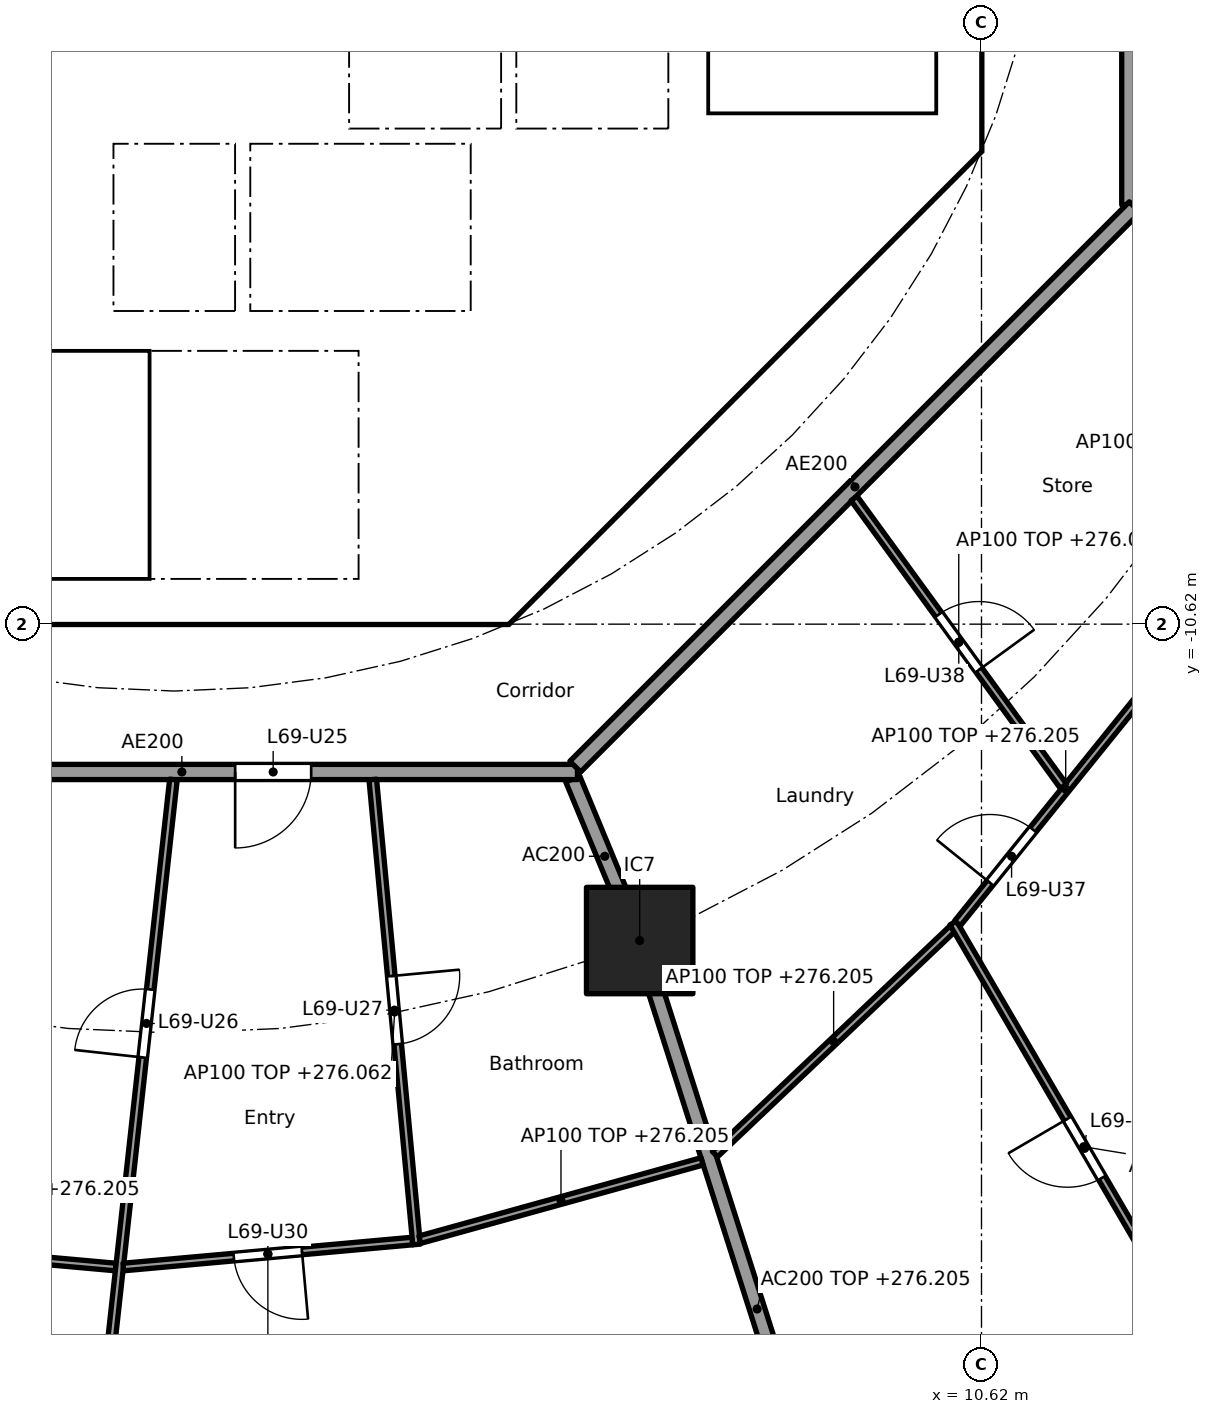
"""IFC4 building model, lengths in metres.
Left out: names, types, materials, properties, quantities, classifications, styles, units other than length and angle.
Written with IfcOpenShell. Run it as: python <this file> out.ifc"""

import sys

from ifc_helpers import new_model, si_unit, direction, frame, frame_2d, origin, origin_2d, place, context, subcontext, project, spatial, polyline, rectangle, outline, extrude, element, fill, save


model = new_model("IFC4")
c1 = context("Model", 3, precision=1e-05, world=origin(), true_north=direction((0.0, 1.0)))
c2 = subcontext(c1, "Body", "Model", "MODEL_VIEW")
j1 = project(units=[si_unit("LENGTHUNIT", "METRE"), si_unit("PLANEANGLEUNIT", "RADIAN")], contexts=[c1])
p1 = place(None, origin())
s1 = spatial("IfcSite", under=j1, at=p1, CompositionType="ELEMENT")
p2 = place(p1, origin())
s2 = spatial("IfcBuilding", under=s1, at=p2, CompositionType="ELEMENT")
p3 = place(p2, frame((0.0, 0.0, 273.3)))
s3 = spatial("IfcBuildingStorey", under=s2, at=p3, CompositionType="ELEMENT", Elevation=273.3)
p4 = place(p3, frame((6.123, -14.782, 0.0), z_axis=(0.0, 0.0, 1.0), x_axis=(1.0, 0.0, 0.0)))
e1 = element("IfcColumn", 1, at=p4, inside=s3, PredefinedType="COLUMN", context=c2, shape_type="SweptSolid", body=[
    extrude(rectangle(XDim=1.4, YDim=1.4, at=origin_2d()), origin(), (0.0, 0.0, 1.0), 3.7),
])
p5 = place(p3, frame((4.613, -9.988, 0.0), z_axis=(0.0, 0.0, 1.0), x_axis=(0.707106781187, 0.707106781187, 0.0)))
e2 = element("IfcWall", 2, at=p5, inside=s3, PredefinedType="SHEAR", context=c2, shape_type="SweptSolid", body=[
    extrude(rectangle(XDim=7.602, YDim=0.6, at=frame_2d((3.801, 0.0))), origin(), (0.0, 0.0, 1.0), 3.44),
])
p6 = place(p5, frame((3.201, 0.0, 0.0)))
e3 = element("IfcOpeningElement", 3, at=p6, cuts=e2, PredefinedType="OPENING", context=c2, shape_type="SweptSolid", body=[
    extrude(rectangle(XDim=1.2, YDim=2.1, at=frame_2d((0.6, 1.05))), frame((0.0, 0.31, 0.0), z_axis=(0.0, -1.0, 0.0), x_axis=(1.0, 0.0, 0.0)), (0.0, 0.0, 1.0), 0.62),
])
p7 = place(p3, frame((4.0, -10.025, 0.0), z_axis=(0.0, 0.0, 1.0), x_axis=(0.0, 1.0, 0.0)))
e4 = element("IfcWall", 4, at=p7, inside=s3, PredefinedType="SOLIDWALL", context=c2, shape_type="SweptSolid", body=[
    extrude(rectangle(XDim=3.0, YDim=0.2, at=frame_2d((1.5, 0.0))), origin(), (0.0, 0.0, 1.0), 3.44),
])
p8 = place(p7, frame((0.975, 0.0, 0.0)))
e5 = element("IfcOpeningElement", 5, at=p8, cuts=e4, PredefinedType="OPENING", context=c2, shape_type="SweptSolid", body=[
    extrude(rectangle(XDim=1.1, YDim=2.1, at=frame_2d((0.55, 1.05))), frame((0.0, 0.11, 0.0), z_axis=(0.0, -1.0, 0.0), x_axis=(1.0, 0.0, 0.0)), (0.0, 0.0, 1.0), 0.22),
])
p9 = place(p3, frame((4.0, -6.5, 0.0), z_axis=(0.0, 0.0, 1.0), x_axis=(0.0, 1.0, 0.0)))
e6 = element("IfcWall", 6, at=p9, inside=s3, PredefinedType="SOLIDWALL", context=c2, shape_type="SweptSolid", body=[
    extrude(rectangle(XDim=2.2, YDim=0.2, at=frame_2d((1.1, 0.0))), origin(), (0.0, 0.0, 1.0), 3.44),
])
p10 = place(p9, frame((0.55, 0.0, 0.0)))
e7 = element("IfcOpeningElement", 7, at=p10, cuts=e6, PredefinedType="OPENING", context=c2, shape_type="SweptSolid", body=[
    extrude(rectangle(XDim=1.1, YDim=2.1, at=frame_2d((0.55, 1.05))), frame((0.0, 0.11, 0.0), z_axis=(0.0, -1.0, 0.0), x_axis=(1.0, 0.0, 0.0)), (0.0, 0.0, 1.0), 0.22),
])
p11 = place(p3, origin())
e8 = element("IfcWall", 8, at=p11, inside=s3, PredefinedType="SHEAR", context=c2, shape_type="SweptSolid", body=[
    extrude(outline(polyline([(-4.152, -10.025), (4.152, -10.025), (4.401, -9.776), (4.825, -10.2), (4.401, -10.625), (-4.401, -10.625), (-4.825, -10.2), (-4.401, -9.776), (-4.152, -10.025)])), origin(), (0.0, 0.0, 1.0), 3.44),
])
p12 = place(p3, origin())
e9 = element("IfcWall", 9, at=p12, inside=s3, PredefinedType="SHEAR", context=c2, shape_type="SweptSolid", body=[
    extrude(outline(polyline([(9.776, -4.401), (10.025, -4.152), (10.025, -3.801), (10.025, 4.152), (9.776, 4.401), (10.2, 4.825), (10.625, 4.401), (10.625, -4.401), (10.2, -4.825), (9.776, -4.401)])), origin(), (0.0, 0.0, 1.0), 3.44),
])
for number, where, z_axis, x_axis in (
    (10, (-0.9, -6.5, 0.0), (0.0, 0.0, 1.0), (0.0, 1.0, 0.0)),
    (11, (0.9, -6.5, 0.0), (0.0, 0.0, 1.0), (0.0, 1.0, 0.0)),
):
    element("IfcWall", number, at=place(p3, frame(where, z_axis=z_axis, x_axis=x_axis)), inside=s3, PredefinedType="SOLIDWALL", context=c2, shape_type="SweptSolid", body=[
        extrude(rectangle(XDim=2.2, YDim=0.2, at=frame_2d((1.1, 0.0))), origin(), (0.0, 0.0, 1.0), 3.44),
    ])
p13 = place(p3, origin())
e12 = element("IfcWall", 12, at=p13, inside=s3, PredefinedType="SOLIDWALL", context=c2, shape_type="SweptSolid", body=[
    extrude(outline(polyline([(-6.7, -2.1), (-6.5, -2.1), (-6.5, -4.1), (-2.3, -4.1), (-2.3, -2.1), (-2.1, -2.1), (-2.1, -4.1), (2.1, -4.1), (2.1, -2.1), (2.3, -2.1), (2.3, -4.1), (4.3, -4.1), (4.3, -2.1), (4.5, -2.1), (4.5, -4.1), (6.5, -4.1), (6.5, -2.1), (6.7, -2.1), (6.7, -4.3), (-6.7, -4.3), (-6.7, -2.1)])), origin(), (0.0, 0.0, 1.0), 3.44),
])
p14 = place(p3, origin())
e13 = element("IfcWall", 13, at=p14, inside=s3, PredefinedType="SOLIDWALL", context=c2, shape_type="SweptSolid", body=[
    extrude(outline(polyline([(4.1, -7.025), (-4.1, -7.025), (-4.1, -6.5), (4.1, -6.5), (4.1, -7.025)])), origin(), (0.0, 0.0, 1.0), 3.44),
])
p15 = place(p3, origin())
e14 = element("IfcWall", 14, at=p15, inside=s3, PredefinedType="SOLIDWALL", context=c2, shape_type="SweptSolid", body=[
    extrude(outline(polyline([(7.025, -3.9), (6.7, -3.9), (6.7, 3.9), (7.025, 3.9), (7.025, -3.9)])), origin(), (0.0, 0.0, 1.0), 3.44),
])
p16 = place(p3, origin())
e15 = element("IfcWall", 15, at=p16, inside=s3, PredefinedType="SOLIDWALL", context=c2, shape_type="SweptSolid", body=[
    extrude(outline(polyline([(10.025, -4.1), (6.7, -4.1), (6.7, -3.9), (10.025, -3.9), (10.025, -4.1)])), origin(), (0.0, 0.0, 1.0), 3.44),
])
p17 = place(p3, frame((5.243, -12.657, 0.0), z_axis=(0.0, 0.0, 1.0), x_axis=(0.382707856524, -0.923869415315, 0.0)))
e16 = element("IfcWall", 16, at=p17, inside=s3, PredefinedType="PARTITIONING", context=c2, shape_type="SweptSolid", body=[
    extrude(rectangle(XDim=2.2, YDim=0.2, at=frame_2d((1.1, 0.0))), origin(), (0.0, 0.0, 1.0), 3.44),
])
p18 = place(p3, frame((6.138, -14.83, 0.0), z_axis=(0.0, 0.0, 1.0), x_axis=(0.303653679037, -0.952782474234, 0.0)))
e17 = element("IfcWall", 17, at=p18, inside=s3, PredefinedType="PARTITIONING", context=c2, shape_type="SweptSolid", body=[
    extrude(rectangle(XDim=10.076, YDim=0.2, at=frame_2d((5.038, 0.0))), origin(), (0.0, 0.0, 1.0), 2.905),
])
p19 = place(p3, frame((12.565, -5.104, 0.0), z_axis=(0.0, 0.0, 1.0), x_axis=(0.0, 1.0, 0.0)))
e18 = element("IfcWall", 18, at=p19, inside=s3, PredefinedType="PARTITIONING", context=c2, shape_type="SweptSolid", body=[
    extrude(rectangle(XDim=10.209, YDim=0.2, at=frame_2d((5.104, 0.0))), origin(), (0.0, 0.0, 1.0), 3.44),
])
p20 = place(p19, frame((4.604, 0.0, 0.0)))
e19 = element("IfcOpeningElement", 19, at=p20, cuts=e18, PredefinedType="OPENING", context=c2, shape_type="SweptSolid", body=[
    extrude(rectangle(XDim=1.0, YDim=2.1, at=frame_2d((0.5, 1.05))), frame((0.0, 0.11, 0.0), z_axis=(0.0, -1.0, 0.0), x_axis=(1.0, 0.0, 0.0)), (0.0, 0.0, 1.0), 0.22),
])
p21 = place(p3, frame((-5.104, -12.565, 0.0), z_axis=(0.0, 0.0, 1.0), x_axis=(1.0, 0.0, 0.0)))
e20 = element("IfcWall", 20, at=p21, inside=s3, PredefinedType="PARTITIONING", context=c2, shape_type="SweptSolid", body=[
    extrude(rectangle(XDim=10.409, YDim=0.2, at=frame_2d((5.205, 0.0))), origin(), (0.0, 0.0, 1.0), 3.44),
])
p22 = place(p21, frame((5.906, 0.0, 0.0)))
e21 = element("IfcOpeningElement", 21, at=p22, cuts=e20, PredefinedType="OPENING", context=c2, shape_type="SweptSolid", body=[
    extrude(rectangle(XDim=1.0, YDim=2.1, at=frame_2d((0.5, 1.05))), frame((0.0, 0.11, 0.0), z_axis=(0.0, -1.0, 0.0), x_axis=(1.0, 0.0, 0.0)), (0.0, 0.0, 1.0), 0.22),
])
p23 = place(p3, frame((5.275, -12.494, 0.0), z_axis=(0.0, 0.0, 1.0), x_axis=(0.707106781187, 0.707106781187, 0.0)))
e22 = element("IfcWall", 22, at=p23, inside=s3, PredefinedType="PARTITIONING", context=c2, shape_type="SweptSolid", body=[
    extrude(rectangle(XDim=10.409, YDim=0.2, at=frame_2d((5.205, 0.0))), origin(), (0.0, 0.0, 1.0), 3.44),
])
p24 = place(p3, frame((-4.573, -18.736, 0.0), z_axis=(0.0, 0.0, 1.0), x_axis=(0.995986472869, -0.089503887414, 0.0)))
e23 = element("IfcWall", 23, at=p24, inside=s3, PredefinedType="PARTITIONING", context=c2, shape_type="SweptSolid", body=[
    extrude(rectangle(XDim=3.819, YDim=0.1, at=frame_2d((1.909, 0.0))), origin(), (0.0, 0.0, 1.0), 2.905),
])
p25 = place(p3, frame((-0.011, -12.664, 0.0), z_axis=(0.0, 0.0, 1.0), x_axis=(-0.109805889692, -0.993953050495, 0.0)))
e24 = element("IfcWall", 24, at=p25, inside=s3, PredefinedType="PARTITIONING", context=c2, shape_type="SweptSolid", body=[
    extrude(rectangle(XDim=15.248, YDim=0.1, at=frame_2d((7.624, 0.0))), origin(), (0.0, 0.0, 1.0), 2.762),
])
p26 = place(p25, frame((2.778, 0.0, 0.0)))
e25 = element("IfcOpeningElement", 25, at=p26, cuts=e24, PredefinedType="OPENING", context=c2, shape_type="SweptSolid", body=[
    extrude(rectangle(XDim=0.9, YDim=2.1, at=frame_2d((0.45, 1.05))), frame((0.0, 0.06, 0.0), z_axis=(0.0, -1.0, 0.0), x_axis=(1.0, 0.0, 0.0)), (0.0, 0.0, 1.0), 0.12),
])
p27 = place(p3, frame((-0.67, -19.077, 0.0), z_axis=(0.0, 0.0, 1.0), x_axis=(0.995986472869, 0.089503887414, 0.0)))
e26 = element("IfcWall", 26, at=p27, inside=s3, PredefinedType="PARTITIONING", context=c2, shape_type="SweptSolid", body=[
    extrude(rectangle(XDim=3.819, YDim=0.1, at=frame_2d((1.909, 0.0))), origin(), (0.0, 0.0, 1.0), 2.905),
])
p28 = place(p27, frame((1.459, 0.0, 0.0)))
e27 = element("IfcOpeningElement", 27, at=p28, cuts=e26, PredefinedType="OPENING", context=c2, shape_type="SweptSolid", body=[
    extrude(rectangle(XDim=0.9, YDim=2.1, at=frame_2d((0.45, 1.05))), frame((0.0, 0.06, 0.0), z_axis=(0.0, -1.0, 0.0), x_axis=(1.0, 0.0, 0.0)), (0.0, 0.0, 1.0), 0.12),
])
p29 = place(p3, frame((2.612, -12.664, 0.0), z_axis=(0.0, 0.0, 1.0), x_axis=(0.093781393779, -0.995592813444, 0.0)))
e28 = element("IfcWall", 28, at=p29, inside=s3, PredefinedType="PARTITIONING", context=c2, shape_type="SweptSolid", body=[
    extrude(rectangle(XDim=6.144, YDim=0.1, at=frame_2d((3.072, 0.0))), origin(), (0.0, 0.0, 1.0), 2.762),
])
p30 = place(p29, frame((2.597, 0.0, 0.0)))
e29 = element("IfcOpeningElement", 29, at=p30, cuts=e28, PredefinedType="OPENING", context=c2, shape_type="SweptSolid", body=[
    extrude(rectangle(XDim=0.9, YDim=2.1, at=frame_2d((0.45, 1.05))), frame((0.0, 0.06, 0.0), z_axis=(0.0, -1.0, 0.0), x_axis=(1.0, 0.0, 0.0)), (0.0, 0.0, 1.0), 0.12),
])
p31 = place(p3, frame((3.231, -18.718, 0.0), z_axis=(0.0, 0.0, 1.0), x_axis=(0.963606817151, 0.267323590318, 0.0)))
e30 = element("IfcWall", 30, at=p31, inside=s3, PredefinedType="PARTITIONING", context=c2, shape_type="SweptSolid", body=[
    extrude(rectangle(XDim=3.853, YDim=0.1, at=frame_2d((1.927, 0.0))), origin(), (0.0, 0.0, 1.0), 2.905),
])
p32 = place(p3, frame((7.113, -17.592, 0.0), z_axis=(0.0, 0.0, 1.0), x_axis=(0.725433932329, 0.688291805723, 0.0)))
e31 = element("IfcWall", 31, at=p32, inside=s3, PredefinedType="PARTITIONING", context=c2, shape_type="SweptSolid", body=[
    extrude(rectangle(XDim=4.305, YDim=0.1, at=frame_2d((2.153, 0.0))), origin(), (0.0, 0.0, 1.0), 2.905),
])
p33 = place(p3, frame((10.248, -14.551, 0.0), z_axis=(0.0, 0.0, 1.0), x_axis=(0.503826483408, -0.86380488226, 0.0)))
e32 = element("IfcWall", 32, at=p33, inside=s3, PredefinedType="PARTITIONING", context=c2, shape_type="SweptSolid", body=[
    extrude(rectangle(XDim=6.816, YDim=0.1, at=frame_2d((3.408, 0.0))), origin(), (0.0, 0.0, 1.0), 3.44),
])
p34 = place(p33, frame((2.983, 0.0, 0.0)))
e33 = element("IfcOpeningElement", 33, at=p34, cuts=e32, PredefinedType="OPENING", context=c2, shape_type="SweptSolid", body=[
    extrude(rectangle(XDim=0.9, YDim=2.1, at=frame_2d((0.45, 1.05))), frame((0.0, 0.06, 0.0), z_axis=(0.0, -1.0, 0.0), x_axis=(1.0, 0.0, 0.0)), (0.0, 0.0, 1.0), 0.12),
])
p35 = place(p3, frame((10.304, -14.555, 0.0), z_axis=(0.0, 0.0, 1.0), x_axis=(0.628170338674, 0.778075848237, 0.0)))
e34 = element("IfcWall", 34, at=p35, inside=s3, PredefinedType="PARTITIONING", context=c2, shape_type="SweptSolid", body=[
    extrude(rectangle(XDim=4.532, YDim=0.1, at=frame_2d((2.266, 0.0))), origin(), (0.0, 0.0, 1.0), 2.905),
])
p36 = place(p35, frame((0.683, 0.0, 0.0)))
e35 = element("IfcOpeningElement", 35, at=p36, cuts=e34, PredefinedType="OPENING", context=c2, shape_type="SweptSolid", body=[
    extrude(rectangle(XDim=0.9, YDim=2.1, at=frame_2d((0.45, 1.05))), frame((0.0, 0.06, 0.0), z_axis=(0.0, -1.0, 0.0), x_axis=(1.0, 0.0, 0.0)), (0.0, 0.0, 1.0), 0.12),
])
p37 = place(p3, frame((8.943, -8.966, 0.0), z_axis=(0.0, 0.0, 1.0), x_axis=(0.588357698232, -0.808600778463, 0.0)))
e36 = element("IfcWall", 36, at=p37, inside=s3, PredefinedType="PARTITIONING", context=c2, shape_type="SweptSolid", body=[
    extrude(rectangle(XDim=4.682, YDim=0.1, at=frame_2d((2.341, 0.0))), origin(), (0.0, 0.0, 1.0), 2.762),
])
p38 = place(p37, frame((1.891, 0.0, 0.0)))
e37 = element("IfcOpeningElement", 37, at=p38, cuts=e36, PredefinedType="OPENING", context=c2, shape_type="SweptSolid", body=[
    extrude(rectangle(XDim=0.9, YDim=2.1, at=frame_2d((0.45, 1.05))), frame((0.0, 0.06, 0.0), z_axis=(0.0, -1.0, 0.0), x_axis=(1.0, 0.0, 0.0)), (0.0, 0.0, 1.0), 0.12),
])
p39 = place(p10, origin())
e38 = element("IfcDoor", 38, at=p39, inside=s3, OperationType="DOUBLE_DOOR_SLIDING", PredefinedType="DOOR", context=c2, shape_type="SweptSolid", body=[
    extrude(rectangle(XDim=1.1, YDim=2.1, at=frame_2d((0.55, 1.05))), frame((0.0, 0.025, 0.0), z_axis=(0.0, -1.0, 0.0), x_axis=(1.0, 0.0, 0.0)), (0.0, 0.0, 1.0), 0.05),
])
fill(e7, e38)
p40 = place(p8, origin())
e39 = element("IfcDoor", 39, at=p40, inside=s3, OperationType="SINGLE_SWING_RIGHT", PredefinedType="DOOR", context=c2, shape_type="SweptSolid", body=[
    extrude(rectangle(XDim=1.1, YDim=2.1, at=frame_2d((0.55, 1.05))), frame((0.0, 0.025, 0.0), z_axis=(0.0, -1.0, 0.0), x_axis=(1.0, 0.0, 0.0)), (0.0, 0.0, 1.0), 0.05),
])
fill(e5, e39)
p41 = place(p6, origin())
e40 = element("IfcDoor", 40, at=p41, inside=s3, OperationType="SINGLE_SWING_RIGHT", PredefinedType="DOOR", context=c2, shape_type="SweptSolid", body=[
    extrude(rectangle(XDim=1.2, YDim=2.1, at=frame_2d((0.6, 1.05))), frame((0.0, 0.025, 0.0), z_axis=(0.0, -1.0, 0.0), x_axis=(1.0, 0.0, 0.0)), (0.0, 0.0, 1.0), 0.05),
])
fill(e3, e40)
p42 = place(p22, frame((1.0, 0.0, 0.0), x_axis=(-1.0, 0.0, 0.0)))
e41 = element("IfcDoor", 41, at=p42, inside=s3, OperationType="SINGLE_SWING_RIGHT", PredefinedType="DOOR", context=c2, shape_type="SweptSolid", body=[
    extrude(rectangle(XDim=1.0, YDim=2.1, at=frame_2d((0.5, 1.05))), frame((0.0, 0.025, 0.0), z_axis=(0.0, -1.0, 0.0), x_axis=(1.0, 0.0, 0.0)), (0.0, 0.0, 1.0), 0.05),
])
fill(e21, e41)
p43 = place(p26, frame((0.9, 0.0, 0.0), x_axis=(-1.0, 0.0, 0.0)))
e42 = element("IfcDoor", 42, at=p43, inside=s3, OperationType="SINGLE_SWING_LEFT", PredefinedType="DOOR", context=c2, shape_type="SweptSolid", body=[
    extrude(rectangle(XDim=0.9, YDim=2.1, at=frame_2d((0.45, 1.05))), frame((0.0, 0.025, 0.0), z_axis=(0.0, -1.0, 0.0), x_axis=(1.0, 0.0, 0.0)), (0.0, 0.0, 1.0), 0.05),
])
fill(e25, e42)
p44 = place(p30, origin())
e43 = element("IfcDoor", 43, at=p44, inside=s3, OperationType="SINGLE_SWING_LEFT", PredefinedType="DOOR", context=c2, shape_type="SweptSolid", body=[
    extrude(rectangle(XDim=0.9, YDim=2.1, at=frame_2d((0.45, 1.05))), frame((0.0, 0.025, 0.0), z_axis=(0.0, -1.0, 0.0), x_axis=(1.0, 0.0, 0.0)), (0.0, 0.0, 1.0), 0.05),
])
fill(e29, e43)
p45 = place(p28, frame((0.9, 0.0, 0.0), x_axis=(-1.0, 0.0, 0.0)))
e44 = element("IfcDoor", 44, at=p45, inside=s3, OperationType="SINGLE_SWING_LEFT", PredefinedType="DOOR", context=c2, shape_type="SweptSolid", body=[
    extrude(rectangle(XDim=0.9, YDim=2.1, at=frame_2d((0.45, 1.05))), frame((0.0, 0.025, 0.0), z_axis=(0.0, -1.0, 0.0), x_axis=(1.0, 0.0, 0.0)), (0.0, 0.0, 1.0), 0.05),
])
fill(e27, e44)
p46 = place(p36, origin())
e45 = element("IfcDoor", 45, at=p46, inside=s3, OperationType="SINGLE_SWING_LEFT", PredefinedType="DOOR", context=c2, shape_type="SweptSolid", body=[
    extrude(rectangle(XDim=0.9, YDim=2.1, at=frame_2d((0.45, 1.05))), frame((0.0, 0.025, 0.0), z_axis=(0.0, -1.0, 0.0), x_axis=(1.0, 0.0, 0.0)), (0.0, 0.0, 1.0), 0.05),
])
fill(e35, e45)
p47 = place(p38, origin())
e46 = element("IfcDoor", 46, at=p47, inside=s3, OperationType="SINGLE_SWING_RIGHT", PredefinedType="DOOR", context=c2, shape_type="SweptSolid", body=[
    extrude(rectangle(XDim=0.9, YDim=2.1, at=frame_2d((0.45, 1.05))), frame((0.0, 0.025, 0.0), z_axis=(0.0, -1.0, 0.0), x_axis=(1.0, 0.0, 0.0)), (0.0, 0.0, 1.0), 0.05),
])
fill(e37, e46)
p48 = place(p34, frame((0.9, 0.0, 0.0), x_axis=(-1.0, 0.0, 0.0)))
e47 = element("IfcDoor", 47, at=p48, inside=s3, OperationType="SINGLE_SWING_RIGHT", PredefinedType="DOOR", context=c2, shape_type="SweptSolid", body=[
    extrude(rectangle(XDim=0.9, YDim=2.1, at=frame_2d((0.45, 1.05))), frame((0.0, 0.025, 0.0), z_axis=(0.0, -1.0, 0.0), x_axis=(1.0, 0.0, 0.0)), (0.0, 0.0, 1.0), 0.05),
])
fill(e33, e47)
save(model, sys.argv[1])
